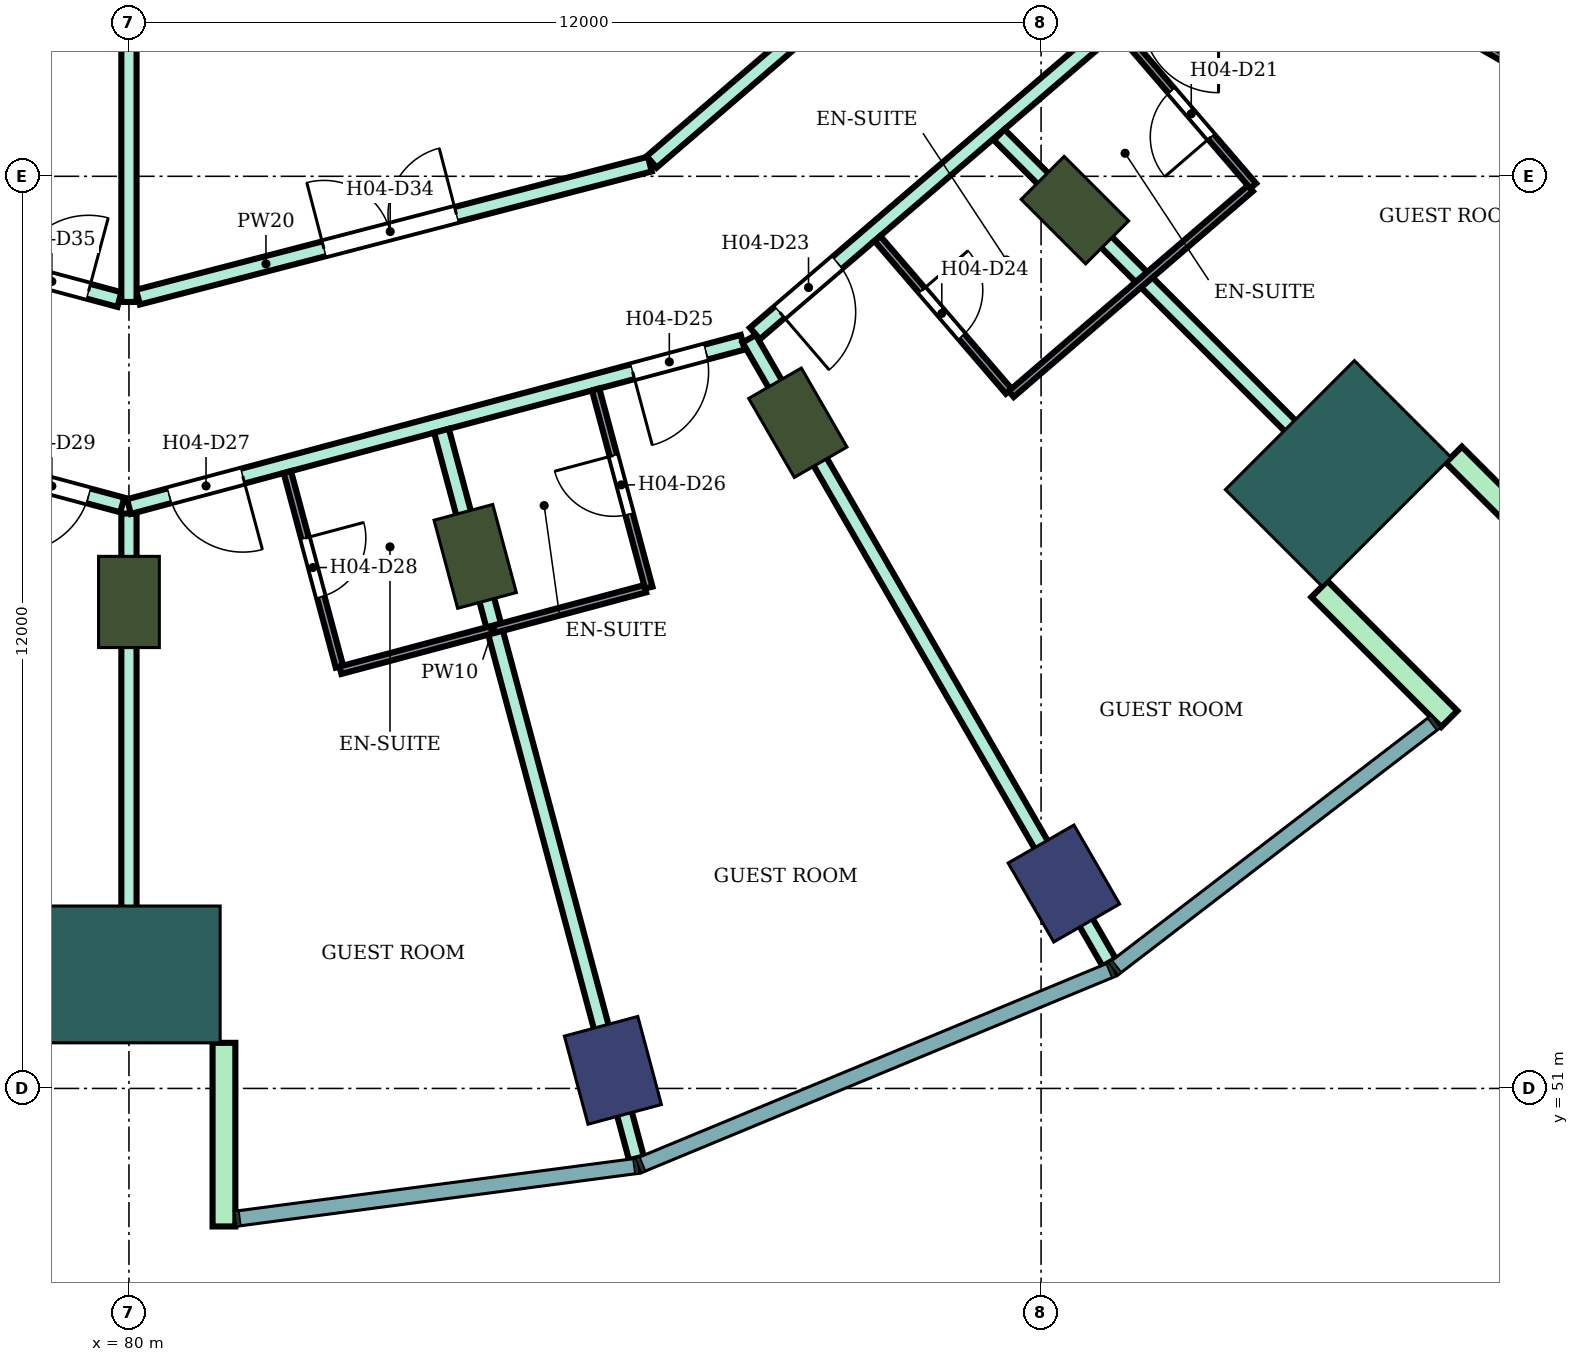
"""IFC4 building model, lengths in metres.
Left out: names, types, materials, properties, quantities, classifications, styles, units other than length and angle.
Written with IfcOpenShell. Run it as: python <this file> out.ifc"""

import sys

from ifc_helpers import new_model, si_unit, direction, frame, frame_2d, origin, origin_2d, place, context, subcontext, project, spatial, rectangle, extrude, element, fill, save


model = new_model("IFC4")
c1 = context("Model", 3, precision=1e-05, world=origin(), true_north=direction((0.0, 1.0)))
c2 = subcontext(c1, "Body", "Model", "MODEL_VIEW")
j1 = project(units=[si_unit("LENGTHUNIT", "METRE"), si_unit("PLANEANGLEUNIT", "RADIAN")], contexts=[c1])
p1 = place(None, origin())
s1 = spatial("IfcSite", under=j1, at=p1, CompositionType="ELEMENT")
p2 = place(p1, origin())
s2 = spatial("IfcBuilding", under=s1, at=p2, CompositionType="ELEMENT")
p3 = place(p2, frame((0.0, 0.0, 66.8)))
s3 = spatial("IfcBuildingStorey", under=s2, at=p3, CompositionType="ELEMENT", Elevation=66.8)
for number, where, z_axis, x_axis in (
    (1, (86.367, 51.238, 0.0), (0.0, 0.0, 1.0), (0.259, -0.966, 0.0)),
    (2, (92.3, 53.696, 0.0), (0.0, 0.0, 1.0), (0.5, -0.866, 0.0)),
):
    element("IfcColumn", number, at=place(p3, frame(where, z_axis=z_axis, x_axis=x_axis)), inside=s3, PredefinedType="COLUMN", context=c2, shape_type="SweptSolid", body=[
        extrude(rectangle(XDim=1.2, YDim=1.0, at=origin_2d()), origin(), (0.0, 0.0, 1.0), 3.8),
    ])
for number, where, z_axis, x_axis in (
    (3, (80.0, 57.4, 0.0), (0.0, 0.0, 1.0), (0.0, -1.0, 0.0)),
    (4, (84.555, 58.0, 0.0), (0.0, 0.0, 1.0), (0.259, -0.966, 0.0)),
    (5, (88.8, 59.758, 0.0), (0.0, 0.0, 1.0), (0.5, -0.866, 0.0)),
    (6, (92.445, 62.555, 0.0), (0.0, 0.0, 1.0), (0.707, -0.707, 0.0)),
):
    element("IfcColumn", number, at=place(p3, frame(where, z_axis=z_axis, x_axis=x_axis)), inside=s3, PredefinedType="COLUMN", context=c2, shape_type="SweptSolid", body=[
        extrude(rectangle(XDim=1.2, YDim=0.8, at=origin_2d()), origin(), (0.0, 0.0, 1.0), 3.8),
    ])
for number, where, z_axis, x_axis in (
    (7, (80.0, 52.5, 0.0), (0.0, 0.0, 1.0), (0.0, -1.0, 0.0)),
    (8, (95.91, 59.09, 0.0), (0.0, 0.0, 1.0), (0.707, -0.707, 0.0)),
):
    element("IfcColumn", number, at=place(p3, frame(where, z_axis=z_axis, x_axis=x_axis)), inside=s3, PredefinedType="COLUMN", context=c2, shape_type="SweptSolid", body=[
        extrude(rectangle(XDim=1.8, YDim=2.4, at=origin_2d()), origin(), (0.0, 0.0, 1.0), 3.8),
    ])
for number, where, z_axis, x_axis in (
    (9, (81.25, 51.6, 0.0), (0.0, 0.0, 1.0), (0.0, -1.0, 0.0)),
    (10, (95.662, 57.57, 0.0), (0.0, 0.0, 1.0), (0.707, -0.707, 0.0)),
    (11, (97.43, 59.338, 0.0), (0.0, 0.0, 1.0), (0.707, -0.707, 0.0)),
):
    element("IfcWall", number, at=place(p3, frame(where, z_axis=z_axis, x_axis=x_axis)), inside=s3, PredefinedType="NOTDEFINED", context=c2, shape_type="SweptSolid", body=[
        extrude(rectangle(XDim=2.416, YDim=0.3, at=frame_2d((1.208, 0.0))), origin(), (0.0, 0.0, 1.0), 3.8),
    ])
p4 = place(p3, frame((71.877, 60.832, 0.0), z_axis=(0.0, 0.0, 1.0), x_axis=(0.965852509869, -0.259092510851, 0.0)))
e12 = element("IfcWall", 12, at=p4, inside=s3, PredefinedType="PARTITIONING", context=c2, shape_type="SweptSolid", body=[
    extrude(rectangle(XDim=8.32, YDim=0.2, at=frame_2d((4.16, 0.0))), origin(), (0.0, 0.0, 1.0), 3.35),
])
p5 = place(p4, frame((6.86, 0.0, 0.0)))
e13 = element("IfcOpeningElement", 13, at=p5, cuts=e12, PredefinedType="OPENING", context=c2, shape_type="SweptSolid", body=[
    extrude(rectangle(XDim=1.0, YDim=2.1, at=frame_2d((0.5, 1.05))), frame((0.0, 0.11, 0.0), z_axis=(0.0, -1.0, 0.0), x_axis=(1.0, 0.0, 0.0)), (0.0, 0.0, 1.0), 0.22),
])
p6 = place(p4, frame((0.55, 0.0, 0.0)))
e14 = element("IfcOpeningElement", 14, at=p6, cuts=e12, PredefinedType="OPENING", context=c2, shape_type="SweptSolid", body=[
    extrude(rectangle(XDim=1.0, YDim=2.1, at=frame_2d((0.5, 1.05))), frame((0.0, 0.11, 0.0), z_axis=(0.0, -1.0, 0.0), x_axis=(1.0, 0.0, 0.0)), (0.0, 0.0, 1.0), 0.22),
])
p7 = place(p3, frame((73.297, 63.143, 0.0), z_axis=(0.0, 0.0, 1.0), x_axis=(0.965859030528, -0.25906820173, 0.0)))
e15 = element("IfcWall", 15, at=p7, inside=s3, PredefinedType="PARTITIONING", context=c2, shape_type="SweptSolid", body=[
    extrude(rectangle(XDim=6.81, YDim=0.2, at=frame_2d((3.405, 0.0))), origin(), (0.0, 0.0, 1.0), 3.35),
])
p8 = place(p7, frame((5.39, 0.0, 0.0)))
e16 = element("IfcOpeningElement", 16, at=p8, cuts=e15, PredefinedType="OPENING", context=c2, shape_type="SweptSolid", body=[
    extrude(rectangle(XDim=1.0, YDim=2.1, at=frame_2d((0.5, 1.05))), frame((0.0, 0.11, 0.0), z_axis=(0.0, -1.0, 0.0), x_axis=(1.0, 0.0, 0.0)), (0.0, 0.0, 1.0), 0.22),
])
p9 = place(p3, frame((80.119, 61.41, 0.0), z_axis=(0.0, 0.0, 1.0), x_axis=(0.967823361235, 0.251630565408, 0.0)))
e17 = element("IfcWall", 17, at=p9, inside=s3, PredefinedType="PARTITIONING", context=c2, shape_type="SweptSolid", body=[
    extrude(rectangle(XDim=6.958, YDim=0.2, at=frame_2d((3.479, 0.0))), origin(), (0.0, 0.0, 1.0), 3.35),
])
p10 = place(p9, frame((2.529, 0.0, 0.0)))
e18 = element("IfcOpeningElement", 18, at=p10, cuts=e17, PredefinedType="OPENING", context=c2, shape_type="SweptSolid", body=[
    extrude(rectangle(XDim=1.8, YDim=2.1, at=frame_2d((0.9, 1.05))), frame((0.0, 0.11, 0.0), z_axis=(0.0, -1.0, 0.0), x_axis=(1.0, 0.0, 0.0)), (0.0, 0.0, 1.0), 0.22),
])
p11 = place(p3, frame((80.0, 51.8, 0.0), z_axis=(0.0, 0.0, 1.0), x_axis=(0.0, 1.0, 0.0)))
e19 = element("IfcWall", 19, at=p11, inside=s3, PredefinedType="PARTITIONING", context=c2, shape_type="SweptSolid", body=[
    extrude(rectangle(XDim=6.764, YDim=0.2, at=frame_2d((3.382, 0.0))), origin(), (0.0, 0.0, 1.0), 3.35),
])
p12 = place(p3, frame((80.0, 58.655, 0.0), z_axis=(0.0, 0.0, 1.0), x_axis=(0.965974635626, 0.258636817424, 0.0)))
e20 = element("IfcWall", 20, at=p12, inside=s3, PredefinedType="PARTITIONING", context=c2, shape_type="SweptSolid", body=[
    extrude(rectangle(XDim=8.36, YDim=0.2, at=frame_2d((4.18, 0.0))), origin(), (0.0, 0.0, 1.0), 3.35),
])
p13 = place(p12, frame((6.86, 0.0, 0.0)))
e21 = element("IfcOpeningElement", 21, at=p13, cuts=e20, PredefinedType="OPENING", context=c2, shape_type="SweptSolid", body=[
    extrude(rectangle(XDim=1.0, YDim=2.1, at=frame_2d((0.5, 1.05))), frame((0.0, 0.11, 0.0), z_axis=(0.0, -1.0, 0.0), x_axis=(1.0, 0.0, 0.0)), (0.0, 0.0, 1.0), 0.22),
])
p14 = place(p12, frame((0.55, 0.0, 0.0)))
e22 = element("IfcOpeningElement", 22, at=p14, cuts=e20, PredefinedType="OPENING", context=c2, shape_type="SweptSolid", body=[
    extrude(rectangle(XDim=1.0, YDim=2.1, at=frame_2d((0.5, 1.05))), frame((0.0, 0.11, 0.0), z_axis=(0.0, -1.0, 0.0), x_axis=(1.0, 0.0, 0.0)), (0.0, 0.0, 1.0), 0.22),
])
p15 = place(p3, frame((80.0, 61.347, 0.0), z_axis=(0.0, 0.0, 1.0), x_axis=(0.0, 1.0, 0.0)))
e23 = element("IfcWall", 23, at=p15, inside=s3, PredefinedType="PARTITIONING", context=c2, shape_type="SweptSolid", body=[
    extrude(rectangle(XDim=5.953, YDim=0.2, at=frame_2d((2.977, 0.0))), origin(), (0.0, 0.0, 1.0), 3.35),
])
p16 = place(p3, frame((84.112, 59.652, 0.0), z_axis=(0.0, 0.0, 1.0), x_axis=(0.258791091927, -0.965933315886, 0.0)))
e24 = element("IfcWall", 24, at=p16, inside=s3, PredefinedType="PARTITIONING", context=c2, shape_type="SweptSolid", body=[
    extrude(rectangle(XDim=9.909, YDim=0.2, at=frame_2d((4.955, 0.0))), origin(), (0.0, 0.0, 1.0), 3.35),
])
p17 = place(p3, frame((86.877, 63.189, 0.0), z_axis=(0.0, 0.0, 1.0), x_axis=(0.758088707506, 0.652151448325, 0.0)))
e25 = element("IfcWall", 25, at=p17, inside=s3, PredefinedType="PARTITIONING", context=c2, shape_type="SweptSolid", body=[
    extrude(rectangle(XDim=5.229, YDim=0.2, at=frame_2d((2.615, 0.0))), origin(), (0.0, 0.0, 1.0), 3.35),
])
p18 = place(p3, frame((88.235, 60.931, 0.0), z_axis=(0.0, 0.0, 1.0), x_axis=(0.758799498714, 0.651324282329, 0.0)))
e26 = element("IfcWall", 26, at=p18, inside=s3, PredefinedType="PARTITIONING", context=c2, shape_type="SweptSolid", body=[
    extrude(rectangle(XDim=6.186, YDim=0.2, at=frame_2d((3.093, 0.0))), origin(), (0.0, 0.0, 1.0), 3.35),
])
p19 = place(p18, frame((0.43, 0.0, 0.0)))
e27 = element("IfcOpeningElement", 27, at=p19, cuts=e26, PredefinedType="OPENING", context=c2, shape_type="SweptSolid", body=[
    extrude(rectangle(XDim=1.0, YDim=2.1, at=frame_2d((0.5, 1.05))), frame((0.0, 0.11, 0.0), z_axis=(0.0, -1.0, 0.0), x_axis=(1.0, 0.0, 0.0)), (0.0, 0.0, 1.0), 0.22),
])
p20 = place(p3, frame((88.159, 60.863, 0.0), z_axis=(0.0, 0.0, 1.0), x_axis=(0.499935840196, -0.866062443296, 0.0)))
e28 = element("IfcWall", 28, at=p20, inside=s3, PredefinedType="PARTITIONING", context=c2, shape_type="SweptSolid", body=[
    extrude(rectangle(XDim=9.475, YDim=0.2, at=frame_2d((4.737, 0.0))), origin(), (0.0, 0.0, 1.0), 3.35),
])
p21 = place(p3, frame((91.448, 63.547, 0.0), z_axis=(0.0, 0.0, 1.0), x_axis=(0.706984810649, -0.707228730688, 0.0)))
e29 = element("IfcWall", 29, at=p21, inside=s3, PredefinedType="PARTITIONING", context=c2, shape_type="SweptSolid", body=[
    extrude(rectangle(XDim=7.006, YDim=0.2, at=frame_2d((3.503, 0.0))), origin(), (0.0, 0.0, 1.0), 3.35),
])
p22 = place(p3, frame((82.084, 59.108, 0.0), z_axis=(0.0, 0.0, 1.0), x_axis=(0.258591746437, -0.965986702121, 0.0)))
e30 = element("IfcWall", 30, at=p22, inside=s3, PredefinedType="PARTITIONING", context=c2, shape_type="SweptSolid", body=[
    extrude(rectangle(XDim=2.649, YDim=0.1, at=frame_2d((1.325, 0.0))), origin(), (0.0, 0.0, 1.0), 3.35),
])
p23 = place(p22, frame((0.9, 0.0, 0.0)))
e31 = element("IfcOpeningElement", 31, at=p23, cuts=e30, PredefinedType="OPENING", context=c2, shape_type="SweptSolid", body=[
    extrude(rectangle(XDim=0.8, YDim=2.1, at=frame_2d((0.4, 1.05))), frame((0.0, 0.06, 0.0), z_axis=(0.0, -1.0, 0.0), x_axis=(1.0, 0.0, 0.0)), (0.0, 0.0, 1.0), 0.12),
])
p24 = place(p3, frame((82.782, 56.501, 0.0), z_axis=(0.0, 0.0, 1.0), x_axis=(0.965999228418, 0.258544949083, 0.0)))
e32 = element("IfcWall", 32, at=p24, inside=s3, PredefinedType="PARTITIONING", context=c2, shape_type="SweptSolid", body=[
    extrude(rectangle(XDim=4.15, YDim=0.1, at=frame_2d((2.075, 0.0))), origin(), (0.0, 0.0, 1.0), 3.35),
])
p25 = place(p3, frame((86.14, 60.196, 0.0), z_axis=(0.0, 0.0, 1.0), x_axis=(0.258945475746, -0.965891940432, 0.0)))
e33 = element("IfcWall", 33, at=p25, inside=s3, PredefinedType="PARTITIONING", context=c2, shape_type="SweptSolid", body=[
    extrude(rectangle(XDim=2.7, YDim=0.1, at=frame_2d((1.35, 0.0))), origin(), (0.0, 0.0, 1.0), 3.35),
])
p26 = place(p25, frame((0.9, 0.0, 0.0)))
e34 = element("IfcOpeningElement", 34, at=p26, cuts=e33, PredefinedType="OPENING", context=c2, shape_type="SweptSolid", body=[
    extrude(rectangle(XDim=0.8, YDim=2.1, at=frame_2d((0.4, 1.05))), frame((0.0, 0.06, 0.0), z_axis=(0.0, -1.0, 0.0), x_axis=(1.0, 0.0, 0.0)), (0.0, 0.0, 1.0), 0.12),
])
p27 = place(p3, frame((89.846, 62.182, 0.0), z_axis=(0.0, 0.0, 1.0), x_axis=(0.652095405055, -0.758136915541, 0.0)))
e35 = element("IfcWall", 35, at=p27, inside=s3, PredefinedType="PARTITIONING", context=c2, shape_type="SweptSolid", body=[
    extrude(rectangle(XDim=2.65, YDim=0.1, at=frame_2d((1.325, 0.0))), origin(), (0.0, 0.0, 1.0), 3.35),
])
p28 = place(p27, frame((0.9, 0.0, 0.0)))
e36 = element("IfcOpeningElement", 36, at=p28, cuts=e35, PredefinedType="OPENING", context=c2, shape_type="SweptSolid", body=[
    extrude(rectangle(XDim=0.8, YDim=2.1, at=frame_2d((0.4, 1.05))), frame((0.0, 0.06, 0.0), z_axis=(0.0, -1.0, 0.0), x_axis=(1.0, 0.0, 0.0)), (0.0, 0.0, 1.0), 0.12),
])
p29 = place(p3, frame((91.607, 60.135, 0.0), z_axis=(0.0, 0.0, 1.0), x_axis=(0.758121792225, 0.65211298726, 0.0)))
e37 = element("IfcWall", 37, at=p29, inside=s3, PredefinedType="PARTITIONING", context=c2, shape_type="SweptSolid", body=[
    extrude(rectangle(XDim=4.15, YDim=0.1, at=frame_2d((2.075, 0.0))), origin(), (0.0, 0.0, 1.0), 3.35),
])
p30 = place(p3, frame((92.965, 64.997, 0.0), z_axis=(0.0, 0.0, 1.0), x_axis=(0.652104424393, -0.758129157655, 0.0)))
e38 = element("IfcWall", 38, at=p30, inside=s3, PredefinedType="PARTITIONING", context=c2, shape_type="SweptSolid", body=[
    extrude(rectangle(XDim=2.8, YDim=0.1, at=frame_2d((1.4, 0.0))), origin(), (0.0, 0.0, 1.0), 3.35),
])
p31 = place(p30, frame((1.15, 0.0, 0.0)))
e39 = element("IfcOpeningElement", 39, at=p31, cuts=e38, PredefinedType="OPENING", context=c2, shape_type="SweptSolid", body=[
    extrude(rectangle(XDim=0.8, YDim=2.1, at=frame_2d((0.4, 1.05))), frame((0.0, 0.06, 0.0), z_axis=(0.0, -1.0, 0.0), x_axis=(1.0, 0.0, 0.0)), (0.0, 0.0, 1.0), 0.12),
])
p32 = place(p3, frame((94.8, 66.455, 0.0), z_axis=(0.0, 0.0, 1.0), x_axis=(0.86602264145, -0.500004784474, 0.0)))
e40 = element("IfcWall", 40, at=p32, inside=s3, PredefinedType="PARTITIONING", context=c2, shape_type="SweptSolid", body=[
    extrude(rectangle(XDim=8.708, YDim=0.1, at=frame_2d((4.354, 0.0))), origin(), (0.0, 0.0, 1.0), 3.35),
])
p33 = place(p32, frame((3.879, 0.0, 0.0)))
e41 = element("IfcOpeningElement", 41, at=p33, cuts=e40, PredefinedType="OPENING", context=c2, shape_type="SweptSolid", body=[
    extrude(rectangle(XDim=0.9, YDim=2.1, at=frame_2d((0.45, 1.05))), frame((0.0, 0.06, 0.0), z_axis=(0.0, -1.0, 0.0), x_axis=(1.0, 0.0, 0.0)), (0.0, 0.0, 1.0), 0.12),
])
p34 = place(p31, frame((0.8, 0.0, 0.0), z_axis=(0.0, 0.0, 1.0), x_axis=(-1.0, 0.0, 0.0)))
e42 = element("IfcDoor", 42, at=p34, inside=s3, OperationType="SINGLE_SWING_LEFT", PredefinedType="DOOR", context=c2, shape_type="SweptSolid", body=[
    extrude(rectangle(XDim=0.8, YDim=2.1, at=frame_2d((0.4, 1.05))), frame((0.0, 0.025, 0.0), z_axis=(0.0, -1.0, 0.0), x_axis=(1.0, 0.0, 0.0)), (0.0, 0.0, 1.0), 0.05),
])
fill(e39, e42)
p35 = place(p19, frame((1.0, 0.0, 0.0), z_axis=(0.0, 0.0, 1.0), x_axis=(-1.0, 0.0, 0.0)))
e43 = element("IfcDoor", 43, at=p35, inside=s3, OperationType="SINGLE_SWING_RIGHT", PredefinedType="DOOR", context=c2, shape_type="SweptSolid", body=[
    extrude(rectangle(XDim=1.0, YDim=2.1, at=frame_2d((0.5, 1.05))), frame((0.0, 0.025, 0.0), z_axis=(0.0, -1.0, 0.0), x_axis=(1.0, 0.0, 0.0)), (0.0, 0.0, 1.0), 0.05),
])
fill(e27, e43)
p36 = place(p28, origin())
e44 = element("IfcDoor", 44, at=p36, inside=s3, OperationType="SINGLE_SWING_LEFT", PredefinedType="DOOR", context=c2, shape_type="SweptSolid", body=[
    extrude(rectangle(XDim=0.8, YDim=2.1, at=frame_2d((0.4, 1.05))), frame((0.0, 0.025, 0.0), z_axis=(0.0, -1.0, 0.0), x_axis=(1.0, 0.0, 0.0)), (0.0, 0.0, 1.0), 0.05),
])
fill(e36, e44)
p37 = place(p13, frame((1.0, 0.0, 0.0), z_axis=(0.0, 0.0, 1.0), x_axis=(-1.0, 0.0, 0.0)))
e45 = element("IfcDoor", 45, at=p37, inside=s3, OperationType="SINGLE_SWING_RIGHT", PredefinedType="DOOR", context=c2, shape_type="SweptSolid", body=[
    extrude(rectangle(XDim=1.0, YDim=2.1, at=frame_2d((0.5, 1.05))), frame((0.0, 0.025, 0.0), z_axis=(0.0, -1.0, 0.0), x_axis=(1.0, 0.0, 0.0)), (0.0, 0.0, 1.0), 0.05),
])
fill(e21, e45)
p38 = place(p26, frame((0.8, 0.0, 0.0), z_axis=(0.0, 0.0, 1.0), x_axis=(-1.0, 0.0, 0.0)))
e46 = element("IfcDoor", 46, at=p38, inside=s3, OperationType="SINGLE_SWING_RIGHT", PredefinedType="DOOR", context=c2, shape_type="SweptSolid", body=[
    extrude(rectangle(XDim=0.8, YDim=2.1, at=frame_2d((0.4, 1.05))), frame((0.0, 0.025, 0.0), z_axis=(0.0, -1.0, 0.0), x_axis=(1.0, 0.0, 0.0)), (0.0, 0.0, 1.0), 0.05),
])
fill(e34, e46)
p39 = place(p14, frame((1.0, 0.0, 0.0), z_axis=(0.0, 0.0, 1.0), x_axis=(-1.0, 0.0, 0.0)))
e47 = element("IfcDoor", 47, at=p39, inside=s3, OperationType="SINGLE_SWING_LEFT", PredefinedType="DOOR", context=c2, shape_type="SweptSolid", body=[
    extrude(rectangle(XDim=1.0, YDim=2.1, at=frame_2d((0.5, 1.05))), frame((0.0, 0.025, 0.0), z_axis=(0.0, -1.0, 0.0), x_axis=(1.0, 0.0, 0.0)), (0.0, 0.0, 1.0), 0.05),
])
fill(e22, e47)
p40 = place(p23, origin())
e48 = element("IfcDoor", 48, at=p40, inside=s3, OperationType="SINGLE_SWING_LEFT", PredefinedType="DOOR", context=c2, shape_type="SweptSolid", body=[
    extrude(rectangle(XDim=0.8, YDim=2.1, at=frame_2d((0.4, 1.05))), frame((0.0, 0.025, 0.0), z_axis=(0.0, -1.0, 0.0), x_axis=(1.0, 0.0, 0.0)), (0.0, 0.0, 1.0), 0.05),
])
fill(e31, e48)
p41 = place(p5, frame((1.0, 0.0, 0.0), z_axis=(0.0, 0.0, 1.0), x_axis=(-1.0, 0.0, 0.0)))
e49 = element("IfcDoor", 49, at=p41, inside=s3, OperationType="SINGLE_SWING_RIGHT", PredefinedType="DOOR", context=c2, shape_type="SweptSolid", body=[
    extrude(rectangle(XDim=1.0, YDim=2.1, at=frame_2d((0.5, 1.05))), frame((0.0, 0.025, 0.0), z_axis=(0.0, -1.0, 0.0), x_axis=(1.0, 0.0, 0.0)), (0.0, 0.0, 1.0), 0.05),
])
fill(e13, e49)
p42 = place(p10, origin())
e50 = element("IfcDoor", 50, at=p42, inside=s3, OperationType="DOUBLE_DOOR_SINGLE_SWING", PredefinedType="DOOR", context=c2, shape_type="SweptSolid", body=[
    extrude(rectangle(XDim=1.8, YDim=2.1, at=frame_2d((0.9, 1.05))), frame((0.0, 0.025, 0.0), z_axis=(0.0, -1.0, 0.0), x_axis=(1.0, 0.0, 0.0)), (0.0, 0.0, 1.0), 0.05),
])
fill(e18, e50)
p43 = place(p8, origin())
e51 = element("IfcDoor", 51, at=p43, inside=s3, OperationType="SINGLE_SWING_RIGHT", PredefinedType="DOOR", context=c2, shape_type="SweptSolid", body=[
    extrude(rectangle(XDim=1.0, YDim=2.1, at=frame_2d((0.5, 1.05))), frame((0.0, 0.025, 0.0), z_axis=(0.0, -1.0, 0.0), x_axis=(1.0, 0.0, 0.0)), (0.0, 0.0, 1.0), 0.05),
])
fill(e16, e51)
save(model, sys.argv[1])
